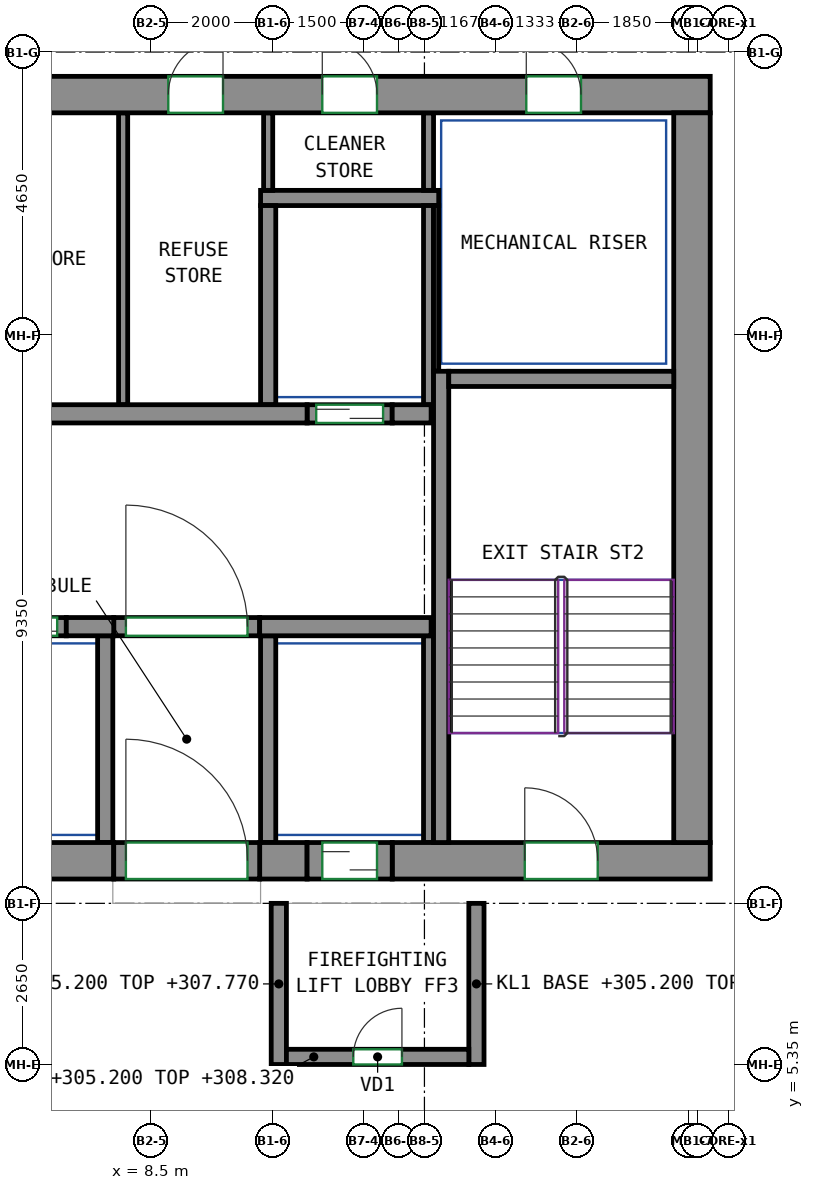
"""IFC4 building model, lengths in metres.
Left out: names, types, materials, properties, quantities, classifications, styles, units other than length and angle.
Written with IfcOpenShell. Run it as: python <this file> out.ifc"""

import sys

from ifc_helpers import new_model, si_unit, direction, frame, frame_2d, origin, place, context, subcontext, project, spatial, rectangle, extrude, source, transform, mapped, element, fill, save


model = new_model("IFC4")
c1 = context("Model", 3, precision=1e-05, world=origin(), true_north=direction((0.0, 1.0)))
c2 = subcontext(c1, "Body", "Model", "MODEL_VIEW")
j1 = project(units=[si_unit("LENGTHUNIT", "METRE"), si_unit("PLANEANGLEUNIT", "RADIAN")], contexts=[c1])
p1 = place(None, origin())
s1 = spatial("IfcSite", under=j1, at=p1, CompositionType="ELEMENT")
p2 = place(p1, origin())
s2 = spatial("IfcBuilding", under=s1, at=p2, CompositionType="ELEMENT")
p3 = place(p2, frame((0.0, 0.0, 305.2)))
s3 = spatial("IfcBuildingStorey", under=s2, at=p3, CompositionType="ELEMENT", Elevation=305.2)
m1 = source(origin(), c2, "Body", "SweptSolid", [
    extrude(rectangle(XDim=14.18, YDim=0.6, at=frame_2d((7.09, 0.0))), origin(), (0.0, 0.0, 1.0), 3.12),
])
p4 = place(p3, frame((-6.29, 8.7, 0.0), z_axis=(0.0, 0.0, 1.0), x_axis=(1.0, 0.0, 0.0)))
e1 = element("IfcWall", 1, at=p4, inside=s3, PredefinedType="SHEAR", context=c2, shape_type="MappedRepresentation", body=[
    mapped(m1, transform((0.0, 0.0, 0.0))),
])
m2 = source(origin(), c2, "Body", "SweptSolid", [
    extrude(rectangle(XDim=0.78, YDim=0.6, at=frame_2d((0.39, 0.0))), origin(), (0.0, 0.0, 1.0), 3.12),
])
p5 = place(p3, frame((10.29, 8.7, 0.0), z_axis=(0.0, 0.0, 1.0), x_axis=(1.0, 0.0, 0.0)))
e2 = element("IfcWall", 2, at=p5, inside=s3, PredefinedType="SHEAR", context=c2, shape_type="MappedRepresentation", body=[
    mapped(m2, transform((0.0, 0.0, 0.0))),
])
m3 = source(origin(), c2, "Body", "SweptSolid", [
    extrude(rectangle(XDim=5.23, YDim=0.6, at=frame_2d((2.615, 0.0))), origin(), (0.0, 0.0, 1.0), 3.12),
])
p6 = place(p3, frame((12.47, 8.7, 0.0), z_axis=(0.0, 0.0, 1.0), x_axis=(1.0, 0.0, 0.0)))
e3 = element("IfcWall", 3, at=p6, inside=s3, PredefinedType="SHEAR", context=c2, shape_type="MappedRepresentation", body=[
    mapped(m3, transform((0.0, 0.0, 0.0))),
])
p7 = place(p6, frame((2.18, 0.0, 0.0)))
e4 = element("IfcOpeningElement", 4, at=p7, cuts=e3, PredefinedType="OPENING", context=c2, shape_type="SweptSolid", body=[
    extrude(rectangle(XDim=1.2, YDim=2.1, at=frame_2d((0.6, 1.05))), frame((0.0, 0.31, 0.0), z_axis=(0.0, -1.0, 0.0), x_axis=(1.0, 0.0, 0.0)), (0.0, 0.0, 1.0), 0.62),
])
m4 = source(origin(), c2, "Body", "SweptSolid", [
    extrude(rectangle(XDim=33.3, YDim=0.6, at=frame_2d((16.65, 0.0))), origin(), (0.0, 0.0, 1.0), 3.12),
])
p8 = place(p3, frame((-15.6, 21.3, 0.0), z_axis=(0.0, 0.0, 1.0), x_axis=(1.0, 0.0, 0.0)))
e5 = element("IfcWall", 5, at=p8, inside=s3, PredefinedType="SHEAR", context=c2, shape_type="MappedRepresentation", body=[
    mapped(m4, transform((0.0, 0.0, 0.0))),
])
p9 = place(p8, frame((6.431, 0.0, 0.0)))
e6 = element("IfcOpeningElement", 6, at=p9, cuts=e5, PredefinedType="OPENING", context=c2, shape_type="SweptSolid", body=[
    extrude(rectangle(XDim=0.9, YDim=2.1, at=frame_2d((0.45, 1.05))), frame((0.0, 0.31, 0.0), z_axis=(0.0, -1.0, 0.0), x_axis=(1.0, 0.0, 0.0)), (0.0, 0.0, 1.0), 0.62),
])
p10 = place(p8, frame((11.738, 0.0, 0.0)))
e7 = element("IfcOpeningElement", 7, at=p10, cuts=e5, PredefinedType="OPENING", context=c2, shape_type="SweptSolid", body=[
    extrude(rectangle(XDim=0.9, YDim=2.1, at=frame_2d((0.45, 1.05))), frame((0.0, 0.31, 0.0), z_axis=(0.0, -1.0, 0.0), x_axis=(1.0, 0.0, 0.0)), (0.0, 0.0, 1.0), 0.62),
])
p11 = place(p8, frame((17.165, 0.0, 0.0)))
e8 = element("IfcOpeningElement", 8, at=p11, cuts=e5, PredefinedType="OPENING", context=c2, shape_type="SweptSolid", body=[
    extrude(rectangle(XDim=0.9, YDim=2.1, at=frame_2d((0.45, 1.05))), frame((0.0, 0.31, 0.0), z_axis=(0.0, -1.0, 0.0), x_axis=(1.0, 0.0, 0.0)), (0.0, 0.0, 1.0), 0.62),
])
p12 = place(p8, frame((21.386, 0.0, 0.0)))
e9 = element("IfcOpeningElement", 9, at=p12, cuts=e5, PredefinedType="OPENING", context=c2, shape_type="SweptSolid", body=[
    extrude(rectangle(XDim=0.9, YDim=2.1, at=frame_2d((0.45, 1.05))), frame((0.0, 0.31, 0.0), z_axis=(0.0, -1.0, 0.0), x_axis=(1.0, 0.0, 0.0)), (0.0, 0.0, 1.0), 0.62),
])
p13 = place(p8, frame((24.387, 0.0, 0.0)))
e10 = element("IfcOpeningElement", 10, at=p13, cuts=e5, PredefinedType="OPENING", context=c2, shape_type="SweptSolid", body=[
    extrude(rectangle(XDim=0.9, YDim=2.1, at=frame_2d((0.45, 1.05))), frame((0.0, 0.31, 0.0), z_axis=(0.0, -1.0, 0.0), x_axis=(1.0, 0.0, 0.0)), (0.0, 0.0, 1.0), 0.62),
])
p14 = place(p8, frame((26.92, 0.0, 0.0)))
e11 = element("IfcOpeningElement", 11, at=p14, cuts=e5, PredefinedType="OPENING", context=c2, shape_type="SweptSolid", body=[
    extrude(rectangle(XDim=0.9, YDim=2.1, at=frame_2d((0.45, 1.05))), frame((0.0, 0.31, 0.0), z_axis=(0.0, -1.0, 0.0), x_axis=(1.0, 0.0, 0.0)), (0.0, 0.0, 1.0), 0.62),
])
p15 = place(p8, frame((2.125, 0.0, 0.0)))
e12 = element("IfcOpeningElement", 12, at=p15, cuts=e5, PredefinedType="OPENING", context=c2, shape_type="SweptSolid", body=[
    extrude(rectangle(XDim=0.9, YDim=2.1, at=frame_2d((0.45, 1.05))), frame((0.0, 0.31, 0.0), z_axis=(0.0, -1.0, 0.0), x_axis=(1.0, 0.0, 0.0)), (0.0, 0.0, 1.0), 0.62),
])
p16 = place(p8, frame((30.275, 0.0, 0.0)))
e13 = element("IfcOpeningElement", 13, at=p16, cuts=e5, PredefinedType="OPENING", context=c2, shape_type="SweptSolid", body=[
    extrude(rectangle(XDim=0.9, YDim=2.1, at=frame_2d((0.45, 1.05))), frame((0.0, 0.31, 0.0), z_axis=(0.0, -1.0, 0.0), x_axis=(1.0, 0.0, 0.0)), (0.0, 0.0, 1.0), 0.62),
])
m5 = source(origin(), c2, "Body", "SweptSolid", [
    extrude(rectangle(XDim=12.0, YDim=0.6, at=frame_2d((6.0, 0.0))), origin(), (0.0, 0.0, 1.0), 3.12),
])
p17 = place(p3, frame((17.4, 9.0, 0.0), z_axis=(0.0, 0.0, 1.0), x_axis=(0.0, 1.0, 0.0)))
e14 = element("IfcWall", 14, at=p17, inside=s3, PredefinedType="SHEAR", context=c2, shape_type="MappedRepresentation", body=[
    mapped(m5, transform((0.0, 0.0, 0.0))),
])
m6 = source(origin(), c2, "Body", "SweptSolid", [
    extrude(rectangle(XDim=7.75, YDim=0.25, at=frame_2d((3.875, 0.0))), origin(), (0.0, 0.0, 1.0), 3.12),
])
p18 = place(p3, frame((13.275, 9.0, 0.0), z_axis=(0.0, 0.0, 1.0), x_axis=(0.0, 1.0, 0.0)))
e15 = element("IfcWall", 15, at=p18, inside=s3, PredefinedType="SHEAR", context=c2, shape_type="MappedRepresentation", body=[
    mapped(m6, transform((0.0, 0.0, 0.0))),
])
m7 = source(origin(), c2, "Body", "SweptSolid", [
    extrude(rectangle(XDim=3.7, YDim=0.25, at=frame_2d((1.85, 0.0))), origin(), (0.0, 0.0, 1.0), 3.12),
])
p19 = place(p3, frame((13.4, 16.625, 0.0), z_axis=(0.0, 0.0, 1.0), x_axis=(1.0, 0.0, 0.0)))
e16 = element("IfcWall", 16, at=p19, inside=s3, PredefinedType="SHEAR", context=c2, shape_type="MappedRepresentation", body=[
    mapped(m7, transform((0.0, 0.0, 0.0))),
])
m8 = source(origin(), c2, "Body", "SweptSolid", [
    extrude(rectangle(XDim=0.78, YDim=0.3, at=frame_2d((0.39, 0.0))), origin(), (0.0, 0.0, 1.0), 3.12),
])
p20 = place(p3, frame((7.11, 12.55, 0.0), z_axis=(0.0, 0.0, 1.0), x_axis=(1.0, 0.0, 0.0)))
e17 = element("IfcWall", 17, at=p20, inside=s3, PredefinedType="SHEAR", context=c2, shape_type="MappedRepresentation", body=[
    mapped(m8, transform((0.0, 0.0, 0.0))),
])
m9 = source(origin(), c2, "Body", "SweptSolid", [
    extrude(rectangle(XDim=2.82, YDim=0.3, at=frame_2d((1.41, 0.0))), origin(), (0.0, 0.0, 1.0), 3.12),
])
p21 = place(p3, frame((10.29, 12.55, 0.0), z_axis=(0.0, 0.0, 1.0), x_axis=(1.0, 0.0, 0.0)))
e18 = element("IfcWall", 18, at=p21, inside=s3, PredefinedType="SHEAR", context=c2, shape_type="MappedRepresentation", body=[
    mapped(m9, transform((0.0, 0.0, 0.0))),
])
m10 = source(origin(), c2, "Body", "SweptSolid", [
    extrude(rectangle(XDim=22.08, YDim=0.3, at=frame_2d((11.04, 0.0))), origin(), (0.0, 0.0, 1.0), 3.12),
])
p22 = place(p3, frame((-11.01, 16.05, 0.0), z_axis=(0.0, 0.0, 1.0), x_axis=(1.0, 0.0, 0.0)))
e19 = element("IfcWall", 19, at=p22, inside=s3, PredefinedType="SHEAR", context=c2, shape_type="MappedRepresentation", body=[
    mapped(m10, transform((0.0, 0.0, 0.0))),
])
m11 = source(origin(), c2, "Body", "SweptSolid", [
    extrude(rectangle(XDim=0.64, YDim=0.3, at=frame_2d((0.32, 0.0))), origin(), (0.0, 0.0, 1.0), 3.12),
])
p23 = place(p3, frame((12.47, 16.05, 0.0), z_axis=(0.0, 0.0, 1.0), x_axis=(1.0, 0.0, 0.0)))
e20 = element("IfcWall", 20, at=p23, inside=s3, PredefinedType="SHEAR", context=c2, shape_type="MappedRepresentation", body=[
    mapped(m11, transform((0.0, 0.0, 0.0))),
])
m12 = source(origin(), c2, "Body", "SweptSolid", [
    extrude(rectangle(XDim=1.4, YDim=0.3, at=frame_2d((0.7, 0.0))), origin(), (0.0, 0.0, 1.0), 3.12),
])
p24 = place(p3, frame((5.71, 12.55, 0.0), z_axis=(0.0, 0.0, 1.0), x_axis=(1.0, 0.0, 0.0)))
e21 = element("IfcWall", 21, at=p24, inside=s3, PredefinedType="PARTITIONING", context=c2, shape_type="MappedRepresentation", body=[
    mapped(m12, transform((0.0, 0.0, 0.0))),
])
p25 = place(p24, frame((0.15, 0.0, 0.0)))
e22 = element("IfcOpeningElement", 22, at=p25, cuts=e21, PredefinedType="OPENING", context=c2, shape_type="SweptSolid", body=[
    extrude(rectangle(XDim=1.1, YDim=2.1, at=frame_2d((0.55, 1.05))), frame((0.0, 0.16, 0.0), z_axis=(0.0, -1.0, 0.0), x_axis=(1.0, 0.0, 0.0)), (0.0, 0.0, 1.0), 0.32),
])
m13 = source(origin(), c2, "Body", "SweptSolid", [
    extrude(rectangle(XDim=1.4, YDim=0.3, at=frame_2d((0.7, 0.0))), origin(), (0.0, 0.0, 1.0), 3.12),
])
p26 = place(p3, frame((11.07, 16.05, 0.0), z_axis=(0.0, 0.0, 1.0), x_axis=(1.0, 0.0, 0.0)))
e23 = element("IfcWall", 23, at=p26, inside=s3, PredefinedType="PARTITIONING", context=c2, shape_type="MappedRepresentation", body=[
    mapped(m13, transform((0.0, 0.0, 0.0))),
])
p27 = place(p26, frame((0.15, 0.0, 0.0)))
e24 = element("IfcOpeningElement", 24, at=p27, cuts=e23, PredefinedType="OPENING", context=c2, shape_type="SweptSolid", body=[
    extrude(rectangle(XDim=1.1, YDim=2.1, at=frame_2d((0.55, 1.05))), frame((0.0, 0.16, 0.0), z_axis=(0.0, -1.0, 0.0), x_axis=(1.0, 0.0, 0.0)), (0.0, 0.0, 1.0), 0.32),
])
m14 = source(origin(), c2, "Body", "SweptSolid", [
    extrude(rectangle(XDim=2.4, YDim=0.3, at=frame_2d((1.2, 0.0))), origin(), (0.0, 0.0, 1.0), 3.12),
])
p28 = place(p3, frame((7.89, 12.55, 0.0), z_axis=(0.0, 0.0, 1.0), x_axis=(1.0, 0.0, 0.0)))
e25 = element("IfcWall", 25, at=p28, inside=s3, PredefinedType="PARTITIONING", context=c2, shape_type="MappedRepresentation", body=[
    mapped(m14, transform((0.0, 0.0, 0.0))),
])
p29 = place(p28, frame((0.2, 0.0, 0.0)))
e26 = element("IfcOpeningElement", 26, at=p29, cuts=e25, PredefinedType="OPENING", context=c2, shape_type="SweptSolid", body=[
    extrude(rectangle(XDim=2.0, YDim=2.1, at=frame_2d((1.0, 1.05))), frame((0.0, 0.16, 0.0), z_axis=(0.0, -1.0, 0.0), x_axis=(1.0, 0.0, 0.0)), (0.0, 0.0, 1.0), 0.32),
])
m15 = source(origin(), c2, "Body", "SweptSolid", [
    extrude(rectangle(XDim=2.65, YDim=0.25, at=frame_2d((1.325, 0.0))), origin(), (0.0, 0.0, 1.0), 2.57),
])
for number, where, z_axis, x_axis in (
    (27, (10.605, 5.35, 0.0), (0.0, 0.0, 1.0), (0.0, 1.0, 0.0)),
    (28, (13.855, 5.35, 0.0), (0.0, 0.0, 1.0), (0.0, 1.0, 0.0)),
):
    element("IfcWall", number, at=place(p3, frame(where, z_axis=z_axis, x_axis=x_axis)), inside=s3, PredefinedType="PARTITIONING", context=c2, shape_type="MappedRepresentation", body=[
        mapped(m15, transform((0.0, 0.0, 0.0))),
    ])
m16 = source(origin(), c2, "Body", "SweptSolid", [
    extrude(rectangle(XDim=3.0, YDim=0.25, at=frame_2d((1.5, 0.0))), origin(), (0.0, 0.0, 1.0), 3.12),
])
p30 = place(p3, frame((10.73, 5.475, 0.0), z_axis=(0.0, 0.0, 1.0), x_axis=(1.0, 0.0, 0.0)))
e29 = element("IfcWall", 29, at=p30, inside=s3, PredefinedType="PARTITIONING", context=c2, shape_type="MappedRepresentation", body=[
    mapped(m16, transform((0.0, 0.0, 0.0))),
])
p31 = place(p30, frame((1.1, 0.0, 0.0)))
e30 = element("IfcOpeningElement", 30, at=p31, cuts=e29, PredefinedType="OPENING", context=c2, shape_type="SweptSolid", body=[
    extrude(rectangle(XDim=0.8, YDim=2.0, at=frame_2d((0.4, 1.0))), frame((0.0, 0.135, 0.0), z_axis=(0.0, -1.0, 0.0), x_axis=(1.0, 0.0, 0.0)), (0.0, 0.0, 1.0), 0.27),
])
m17 = source(origin(), c2, "Body", "SweptSolid", [
    extrude(rectangle(XDim=2.93, YDim=0.25, at=frame_2d((1.465, 0.0))), origin(), (0.0, 0.0, 1.0), 3.12),
])
p32 = place(p3, frame((10.305, 19.6, 0.0), z_axis=(0.0, 0.0, 1.0), x_axis=(1.0, 0.0, 0.0)))
e31 = element("IfcWall", 31, at=p32, inside=s3, PredefinedType="PARTITIONING", context=c2, shape_type="MappedRepresentation", body=[
    mapped(m17, transform((0.0, 0.0, 0.0))),
])
m18 = source(origin(), c2, "Body", "SweptSolid", [
    extrude(rectangle(XDim=3.275, YDim=0.165, at=frame_2d((1.638, 0.0))), origin(), (0.0, 0.0, 1.0), 3.12),
])
p33 = place(p3, frame((13.067, 16.2, 0.0), z_axis=(0.0, 0.0, 1.0), x_axis=(0.0, 1.0, 0.0)))
e32 = element("IfcWall", 32, at=p33, inside=s3, PredefinedType="PARTITIONING", context=c2, shape_type="MappedRepresentation", body=[
    mapped(m18, transform((0.0, 0.0, 0.0))),
])
m19 = source(origin(), c2, "Body", "SweptSolid", [
    extrude(rectangle(XDim=1.275, YDim=0.165, at=frame_2d((0.637, 0.0))), origin(), (0.0, 0.0, 1.0), 3.12),
])
p34 = place(p3, frame((13.067, 19.725, 0.0), z_axis=(0.0, 0.0, 1.0), x_axis=(0.0, 1.0, 0.0)))
e33 = element("IfcWall", 33, at=p34, inside=s3, PredefinedType="PARTITIONING", context=c2, shape_type="MappedRepresentation", body=[
    mapped(m19, transform((0.0, 0.0, 0.0))),
])
m20 = source(origin(), c2, "Body", "SweptSolid", [
    extrude(rectangle(XDim=3.275, YDim=0.25, at=frame_2d((1.638, 0.0))), origin(), (0.0, 0.0, 1.0), 3.12),
])
p35 = place(p3, frame((10.43, 16.2, 0.0), z_axis=(0.0, 0.0, 1.0), x_axis=(0.0, 1.0, 0.0)))
e34 = element("IfcWall", 34, at=p35, inside=s3, PredefinedType="PARTITIONING", context=c2, shape_type="MappedRepresentation", body=[
    mapped(m20, transform((0.0, 0.0, 0.0))),
])
m21 = source(origin(), c2, "Body", "SweptSolid", [
    extrude(rectangle(XDim=2.725, YDim=0.085, at=frame_2d((1.363, 0.0))), origin(), (0.0, 0.0, 1.0), 3.12),
])
p36 = place(p3, frame((13.192, 16.75, 0.0), z_axis=(0.0, 0.0, 1.0), x_axis=(0.0, 1.0, 0.0)))
e35 = element("IfcWall", 35, at=p36, inside=s3, PredefinedType="PARTITIONING", context=c2, shape_type="MappedRepresentation", body=[
    mapped(m21, transform((0.0, 0.0, 0.0))),
])
m22 = source(origin(), c2, "Body", "SweptSolid", [
    extrude(rectangle(XDim=3.4, YDim=0.25, at=frame_2d((1.7, 0.0))), origin(), (0.0, 0.0, 1.0), 3.12),
])
p37 = place(p3, frame((10.43, 9.0, 0.0), z_axis=(0.0, 0.0, 1.0), x_axis=(0.0, 1.0, 0.0)))
e36 = element("IfcWall", 36, at=p37, inside=s3, PredefinedType="PARTITIONING", context=c2, shape_type="MappedRepresentation", body=[
    mapped(m22, transform((0.0, 0.0, 0.0))),
])
m23 = source(origin(), c2, "Body", "SweptSolid", [
    extrude(rectangle(XDim=3.4, YDim=0.165, at=frame_2d((1.7, 0.0))), origin(), (0.0, 0.0, 1.0), 3.12),
])
p38 = place(p3, frame((13.067, 9.0, 0.0), z_axis=(0.0, 0.0, 1.0), x_axis=(0.0, 1.0, 0.0)))
e37 = element("IfcWall", 37, at=p38, inside=s3, PredefinedType="PARTITIONING", context=c2, shape_type="MappedRepresentation", body=[
    mapped(m23, transform((0.0, 0.0, 0.0))),
])
p39 = place(p3, frame((7.75, 9.0, 0.0), z_axis=(0.0, 0.0, 1.0), x_axis=(0.0, 1.0, 0.0)))
e38 = element("IfcWall", 38, at=p39, inside=s3, PredefinedType="PARTITIONING", context=c2, shape_type="MappedRepresentation", body=[
    mapped(m22, transform((0.0, 0.0, 0.0))),
])
m24 = source(origin(), c2, "Body", "SweptSolid", [
    extrude(rectangle(XDim=4.8, YDim=0.15, at=frame_2d((2.4, 0.0))), origin(), (0.0, 0.0, 1.0), 3.12),
])
p40 = place(p3, frame((8.045, 16.2, 0.0), z_axis=(0.0, 0.0, 1.0), x_axis=(0.0, 1.0, 0.0)))
e39 = element("IfcWall", 39, at=p40, inside=s3, PredefinedType="PARTITIONING", context=c2, shape_type="MappedRepresentation", body=[
    mapped(m24, transform((0.0, 0.0, 0.0))),
])
m25 = source(origin(), c2, "Body", "SweptSolid", [
    extrude(rectangle(XDim=1.275, YDim=0.15, at=frame_2d((0.637, 0.0))), origin(), (0.0, 0.0, 1.0), 3.12),
])
p41 = place(p3, frame((10.43, 19.725, 0.0), z_axis=(0.0, 0.0, 1.0), x_axis=(0.0, 1.0, 0.0)))
e40 = element("IfcWall", 40, at=p41, inside=s3, PredefinedType="PARTITIONING", context=c2, shape_type="MappedRepresentation", body=[
    mapped(m25, transform((0.0, 0.0, 0.0))),
])
m26 = source(origin(), c2, "Body", "SweptSolid", [
    extrude(rectangle(XDim=2.4, YDim=0.6, at=frame_2d((1.2, 0.0))), origin(), (0.0, 0.0, 1.0), 2.7),
])
p42 = place(p3, frame((7.89, 8.7, 0.0), z_axis=(0.0, 0.0, 1.0), x_axis=(1.0, 0.0, 0.0)))
e41 = element("IfcWall", 41, at=p42, inside=s3, PredefinedType="PARTITIONING", context=c2, shape_type="MappedRepresentation", body=[
    mapped(m26, transform((0.0, 0.0, 0.0))),
])
p43 = place(p42, frame((0.2, 0.0, 0.0)))
e42 = element("IfcOpeningElement", 42, at=p43, cuts=e41, PredefinedType="OPENING", context=c2, shape_type="SweptSolid", body=[
    extrude(rectangle(XDim=2.0, YDim=2.1, at=frame_2d((1.0, 1.05))), frame((0.0, 0.31, 0.0), z_axis=(0.0, -1.0, 0.0), x_axis=(1.0, 0.0, 0.0)), (0.0, 0.0, 1.0), 0.62),
])
m27 = source(origin(), c2, "Body", "SweptSolid", [
    extrude(rectangle(XDim=1.4, YDim=0.6, at=frame_2d((0.7, 0.0))), origin(), (0.0, 0.0, 1.0), 2.7),
])
p44 = place(p3, frame((11.07, 8.7, 0.0), z_axis=(0.0, 0.0, 1.0), x_axis=(1.0, 0.0, 0.0)))
e43 = element("IfcWall", 43, at=p44, inside=s3, PredefinedType="PARTITIONING", context=c2, shape_type="MappedRepresentation", body=[
    mapped(m27, transform((0.0, 0.0, 0.0))),
])
p45 = place(p44, frame((0.25, 0.0, 0.0)))
e44 = element("IfcOpeningElement", 44, at=p45, cuts=e43, PredefinedType="OPENING", context=c2, shape_type="SweptSolid", body=[
    extrude(rectangle(XDim=0.9, YDim=2.1, at=frame_2d((0.45, 1.05))), frame((0.0, 0.31, 0.0), z_axis=(0.0, -1.0, 0.0), x_axis=(1.0, 0.0, 0.0)), (0.0, 0.0, 1.0), 0.62),
])
p46 = place(p29, origin())
e45 = element("IfcDoor", 45, at=p46, inside=s3, OperationType="DOUBLE_DOOR_SINGLE_SWING", PredefinedType="DOOR", context=c2, shape_type="SweptSolid", body=[
    extrude(rectangle(XDim=2.0, YDim=2.1, at=frame_2d((1.0, 1.05))), frame((0.0, 0.025, 0.0), z_axis=(0.0, -1.0, 0.0), x_axis=(1.0, 0.0, 0.0)), (0.0, 0.0, 1.0), 0.05),
])
fill(e26, e45)
p47 = place(p43, origin())
e46 = element("IfcDoor", 46, at=p47, inside=s3, OperationType="DOUBLE_DOOR_SINGLE_SWING", PredefinedType="DOOR", context=c2, shape_type="SweptSolid", body=[
    extrude(rectangle(XDim=2.0, YDim=2.1, at=frame_2d((1.0, 1.05))), frame((0.0, 0.205, 0.0), z_axis=(0.0, -1.0, 0.0), x_axis=(1.0, 0.0, 0.0)), (0.0, 0.0, 1.0), 0.05),
])
fill(e42, e46)
p48 = place(p31, origin())
e47 = element("IfcDoor", 47, at=p48, inside=s3, OperationType="SINGLE_SWING_RIGHT", PredefinedType="DOOR", context=c2, shape_type="SweptSolid", body=[
    extrude(rectangle(XDim=0.8, YDim=2.0, at=frame_2d((0.4, 1.0))), frame((0.0, 0.025, 0.0), z_axis=(0.0, -1.0, 0.0), x_axis=(1.0, 0.0, 0.0)), (0.0, 0.0, 1.0), 0.05),
])
fill(e30, e47)
p49 = place(p45, origin())
e48 = element("IfcDoor", 48, at=p49, inside=s3, OperationType="SLIDING_TO_LEFT", PredefinedType="DOOR", context=c2, shape_type="SweptSolid", body=[
    extrude(rectangle(XDim=0.9, YDim=2.1, at=frame_2d((0.45, 1.05))), frame((0.0, 0.205, 0.0), z_axis=(0.0, -1.0, 0.0), x_axis=(1.0, 0.0, 0.0)), (0.0, 0.0, 1.0), 0.05),
])
fill(e44, e48)
p50 = place(p25, origin())
e49 = element("IfcDoor", 49, at=p50, inside=s3, OperationType="DOUBLE_DOOR_SLIDING", PredefinedType="DOOR", context=c2, shape_type="SweptSolid", body=[
    extrude(rectangle(XDim=1.1, YDim=2.1, at=frame_2d((0.55, 1.05))), frame((0.0, 0.025, 0.0), z_axis=(0.0, -1.0, 0.0), x_axis=(1.0, 0.0, 0.0)), (0.0, 0.0, 1.0), 0.05),
])
fill(e22, e49)
p51 = place(p27, origin())
e50 = element("IfcDoor", 50, at=p51, inside=s3, OperationType="DOUBLE_DOOR_SLIDING", PredefinedType="DOOR", context=c2, shape_type="SweptSolid", body=[
    extrude(rectangle(XDim=1.1, YDim=2.1, at=frame_2d((0.55, 1.05))), frame((0.0, 0.025, 0.0), z_axis=(0.0, -1.0, 0.0), x_axis=(1.0, 0.0, 0.0)), (0.0, 0.0, 1.0), 0.05),
])
fill(e24, e50)
p52 = place(p13, origin())
e51 = element("IfcDoor", 51, at=p52, inside=s3, OperationType="SINGLE_SWING_RIGHT", PredefinedType="DOOR", context=c2, shape_type="SweptSolid", body=[
    extrude(rectangle(XDim=0.9, YDim=2.1, at=frame_2d((0.45, 1.05))), frame((0.0, -0.155, 0.0), z_axis=(0.0, -1.0, 0.0), x_axis=(1.0, 0.0, 0.0)), (0.0, 0.0, 1.0), 0.05),
])
fill(e10, e51)
p53 = place(p14, origin())
e52 = element("IfcDoor", 52, at=p53, inside=s3, OperationType="SINGLE_SWING_LEFT", PredefinedType="DOOR", context=c2, shape_type="SweptSolid", body=[
    extrude(rectangle(XDim=0.9, YDim=2.1, at=frame_2d((0.45, 1.05))), frame((0.0, -0.155, 0.0), z_axis=(0.0, -1.0, 0.0), x_axis=(1.0, 0.0, 0.0)), (0.0, 0.0, 1.0), 0.05),
])
fill(e11, e52)
p54 = place(p16, origin())
e53 = element("IfcDoor", 53, at=p54, inside=s3, OperationType="SINGLE_SWING_LEFT", PredefinedType="DOOR", context=c2, shape_type="SweptSolid", body=[
    extrude(rectangle(XDim=0.9, YDim=2.1, at=frame_2d((0.45, 1.05))), frame((0.0, -0.155, 0.0), z_axis=(0.0, -1.0, 0.0), x_axis=(1.0, 0.0, 0.0)), (0.0, 0.0, 1.0), 0.05),
])
fill(e13, e53)
p55 = place(p7, origin())
e54 = element("IfcDoor", 54, at=p55, inside=s3, OperationType="DOUBLE_DOOR_SINGLE_SWING", PredefinedType="DOOR", context=c2, shape_type="SweptSolid", body=[
    extrude(rectangle(XDim=1.2, YDim=2.1, at=frame_2d((0.6, 1.05))), frame((0.0, 0.205, 0.0), z_axis=(0.0, -1.0, 0.0), x_axis=(1.0, 0.0, 0.0)), (0.0, 0.0, 1.0), 0.05),
])
fill(e4, e54)
save(model, sys.argv[1])
